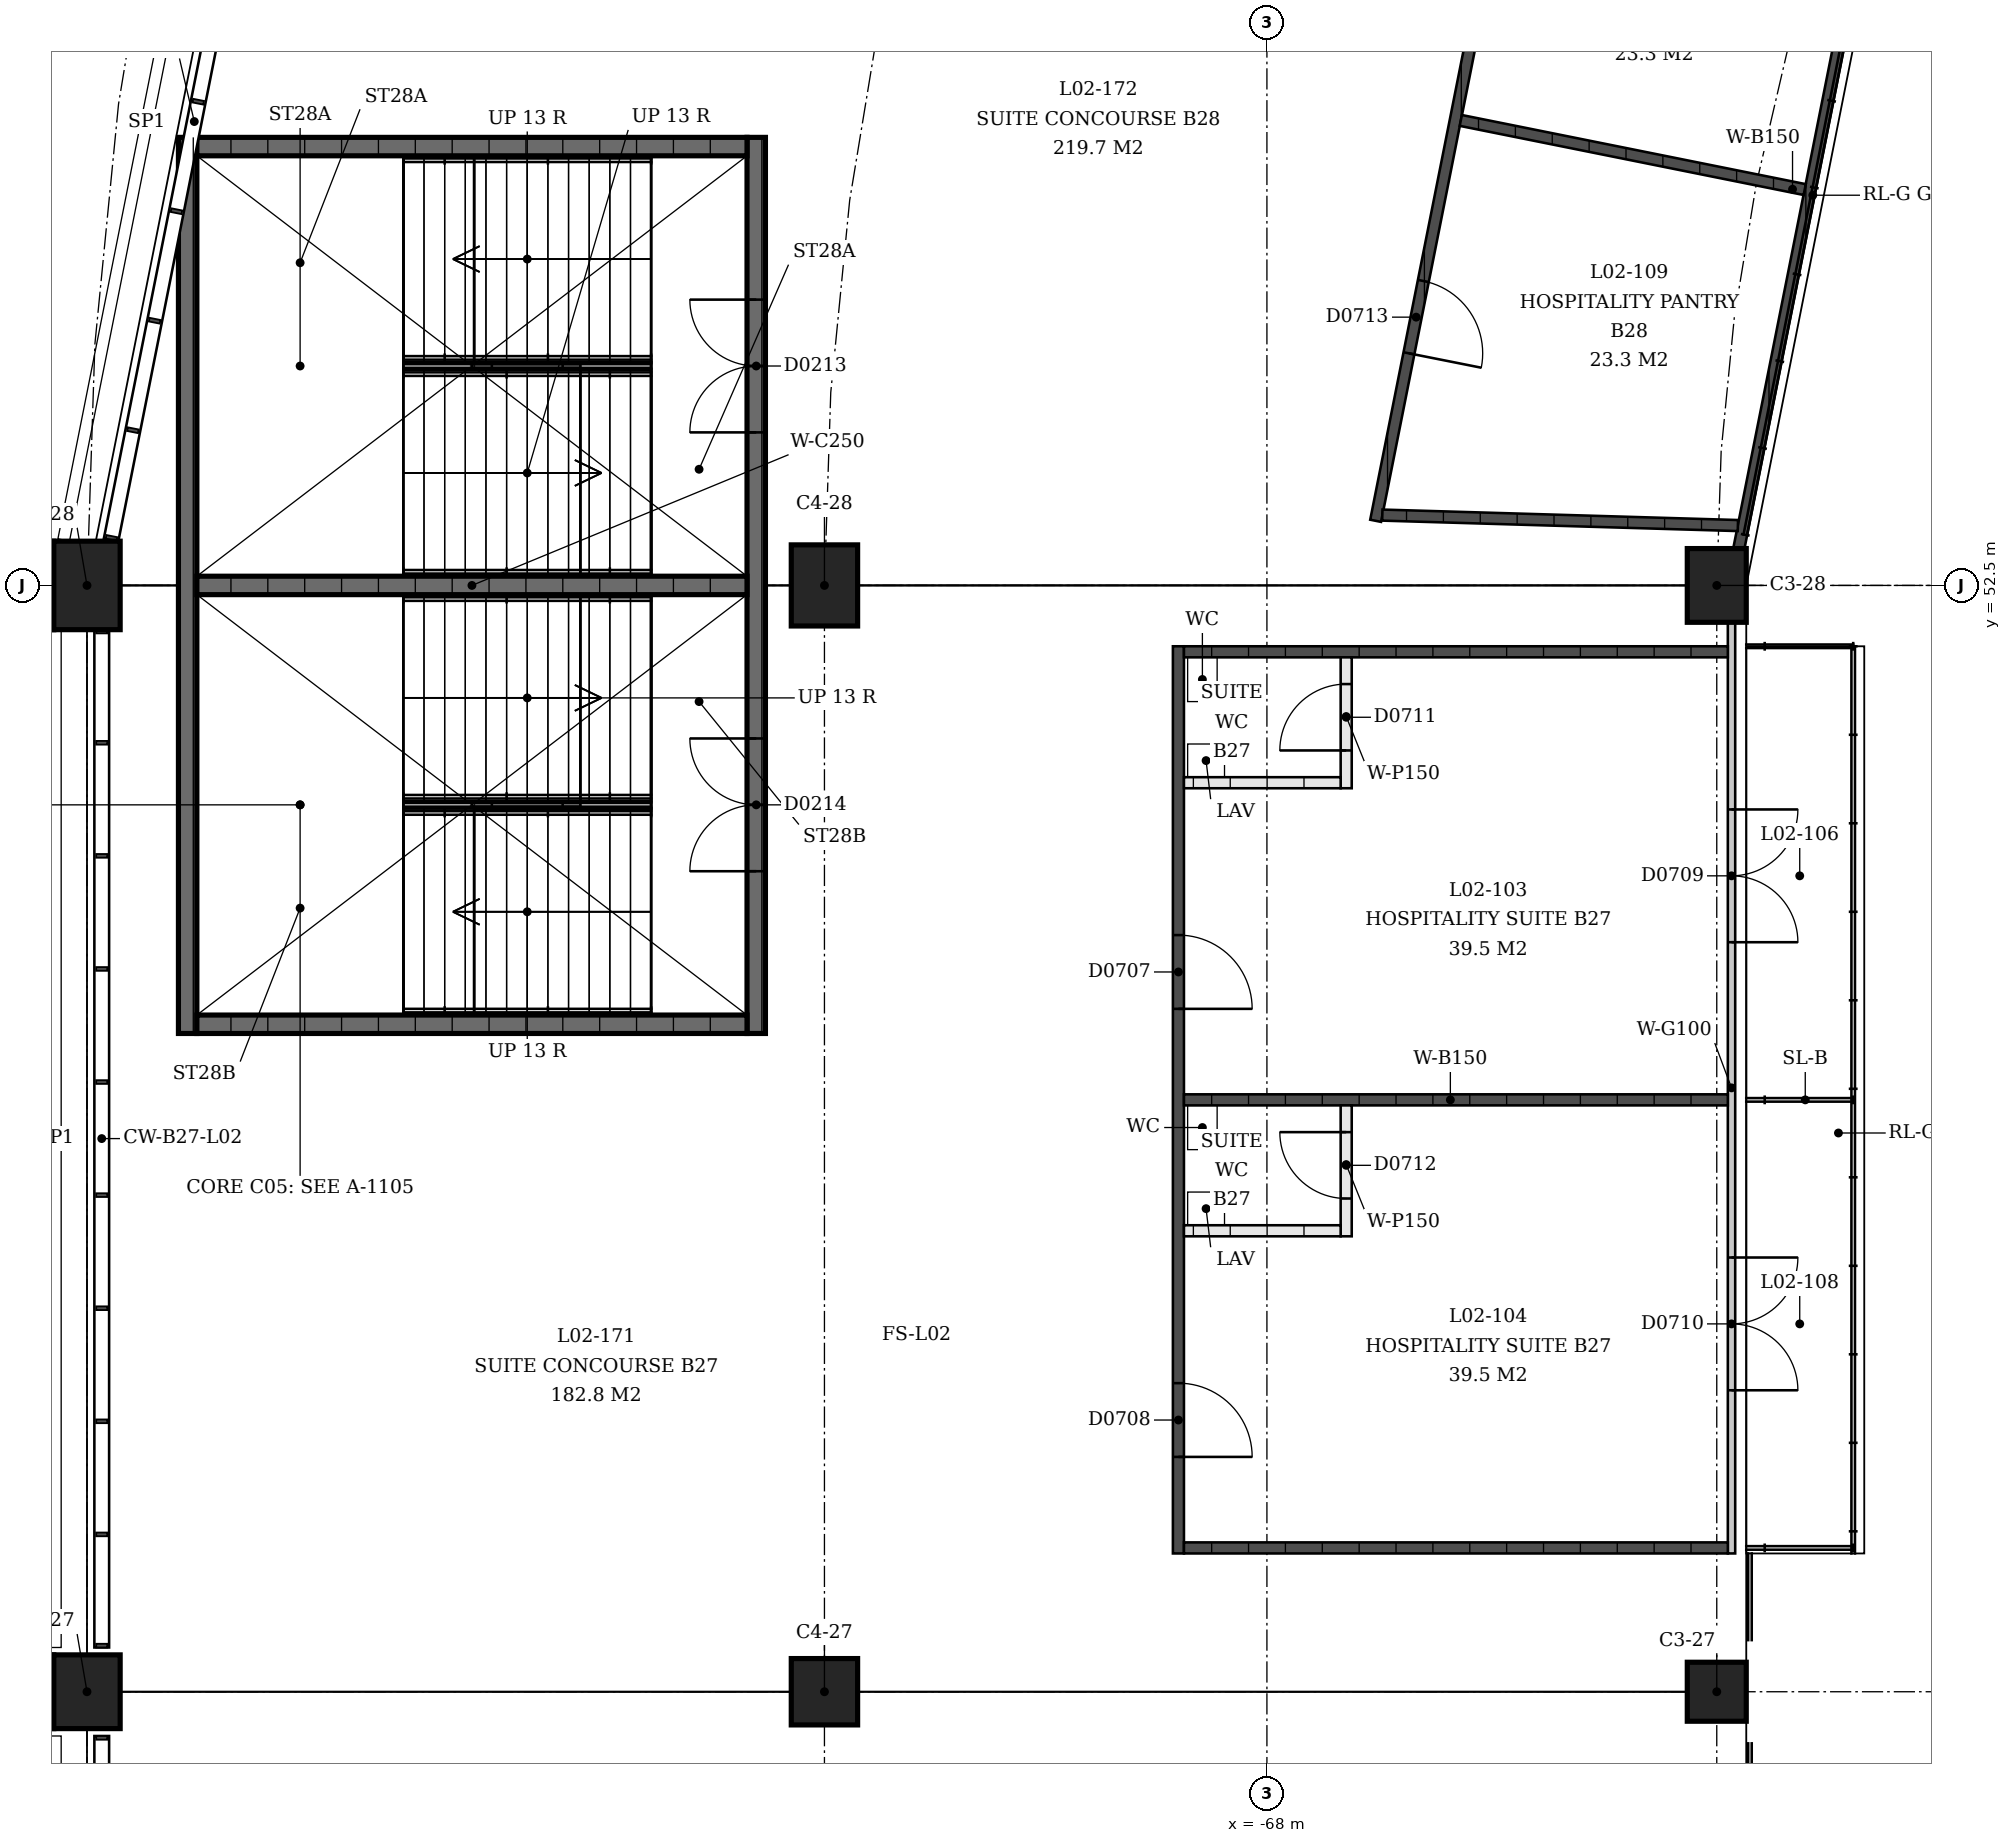
"""IFC4 building model, lengths in metres.
Left out: names, types, materials, properties, quantities, classifications, styles, units other than length and angle.
Written with IfcOpenShell. Run it as: python <this file> out.ifc"""

import sys

from ifc_helpers import new_model, si_unit, direction, frame, frame_2d, origin, origin_2d, place, context, subcontext, project, spatial, rectangle, extrude, element, fill, save


model = new_model("IFC4")
c1 = context("Model", 3, precision=1e-05, world=origin(), true_north=direction((0.0, 1.0)))
c2 = subcontext(c1, "Body", "Model", "MODEL_VIEW")
j1 = project(units=[si_unit("LENGTHUNIT", "METRE"), si_unit("PLANEANGLEUNIT", "RADIAN")], contexts=[c1])
p1 = place(None, origin())
s1 = spatial("IfcSite", under=j1, at=p1, CompositionType="ELEMENT")
p2 = place(p1, origin())
s2 = spatial("IfcBuilding", under=s1, at=p2, CompositionType="ELEMENT")
p3 = place(p2, frame((0.0, 0.0, 9.0)))
s3 = spatial("IfcBuildingStorey", under=s2, at=p3, CompositionType="ELEMENT", Elevation=9.0)
p4 = place(p3, frame((-61.9, 37.5, 0.0), z_axis=(0.0, 0.0, 1.0), x_axis=(0.0, -1.0, 0.0)))
e1 = element("IfcColumn", 1, at=p4, inside=s3, PredefinedType="COLUMN", context=c2, shape_type="SweptSolid", body=[
    extrude(rectangle(XDim=0.8, YDim=0.8, at=origin_2d()), origin(), (0.0, 0.0, 1.0), 4.5),
])
p5 = place(p3, frame((-74.0, 37.5, 0.0), z_axis=(0.0, 0.0, 1.0), x_axis=(0.0, -1.0, 0.0)))
e2 = element("IfcColumn", 2, at=p5, inside=s3, PredefinedType="COLUMN", context=c2, shape_type="SweptSolid", body=[
    extrude(rectangle(XDim=0.9, YDim=0.9, at=origin_2d()), origin(), (0.0, 0.0, 1.0), 4.5),
])
p6 = place(p3, frame((-84.0, 37.5, 0.0), z_axis=(0.0, 0.0, 1.0), x_axis=(0.0, -1.0, 0.0)))
e3 = element("IfcColumn", 3, at=p6, inside=s3, PredefinedType="COLUMN", context=c2, shape_type="SweptSolid", body=[
    extrude(rectangle(XDim=1.0, YDim=0.9, at=origin_2d()), origin(), (0.0, 0.0, 1.0), 4.5),
])
p7 = place(p3, frame((-61.9, 52.5, 0.0), z_axis=(0.0, 0.0, 1.0), x_axis=(0.0, -1.0, 0.0)))
e4 = element("IfcColumn", 4, at=p7, inside=s3, PredefinedType="COLUMN", context=c2, shape_type="SweptSolid", body=[
    extrude(rectangle(XDim=1.0, YDim=0.8, at=origin_2d()), origin(), (0.0, 0.0, 1.0), 4.5),
])
p8 = place(p3, frame((-74.0, 52.5, 0.0), z_axis=(0.0, 0.0, 1.0), x_axis=(0.0, -1.0, 0.0)))
e5 = element("IfcColumn", 5, at=p8, inside=s3, PredefinedType="COLUMN", context=c2, shape_type="SweptSolid", body=[
    extrude(rectangle(XDim=1.1, YDim=0.9, at=origin_2d()), origin(), (0.0, 0.0, 1.0), 4.5),
])
p9 = place(p3, frame((-84.0, 52.5, 0.0), z_axis=(0.0, 0.0, 1.0), x_axis=(0.0, -1.0, 0.0)))
e6 = element("IfcColumn", 6, at=p9, inside=s3, PredefinedType="COLUMN", context=c2, shape_type="SweptSolid", body=[
    extrude(rectangle(XDim=1.2, YDim=0.9, at=origin_2d()), origin(), (0.0, 0.0, 1.0), 4.5),
])
p10 = place(p3, frame((-74.925, 58.575, 0.0), z_axis=(0.0, 0.0, 1.0), x_axis=(0.0, -1.0, 0.0)))
e7 = element("IfcWall", 7, at=p10, inside=s3, PredefinedType="SHEAR", context=c2, shape_type="SweptSolid", body=[
    extrude(rectangle(XDim=12.15, YDim=0.25, at=frame_2d((6.075, 0.0))), origin(), (0.0, 0.0, 1.0), 4.09),
])
p11 = place(p10, frame((2.2, 0.0, 0.0)))
e8 = element("IfcOpeningElement", 8, at=p11, cuts=e7, PredefinedType="OPENING", context=c2, shape_type="SweptSolid", body=[
    extrude(rectangle(XDim=1.8, YDim=2.1, at=frame_2d((0.9, 1.05))), frame((0.0, 0.125, 0.0), z_axis=(0.0, -1.0, 0.0), x_axis=(1.0, 0.0, 0.0)), (0.0, 0.0, 1.0), 0.25),
])
p12 = place(p10, frame((8.15, 0.0, 0.0)))
e9 = element("IfcOpeningElement", 9, at=p12, cuts=e7, PredefinedType="OPENING", context=c2, shape_type="SweptSolid", body=[
    extrude(rectangle(XDim=1.8, YDim=2.1, at=frame_2d((0.9, 1.05))), frame((0.0, 0.125, 0.0), z_axis=(0.0, -1.0, 0.0), x_axis=(1.0, 0.0, 0.0)), (0.0, 0.0, 1.0), 0.25),
])
p13 = place(p3, frame((-82.635, 58.575, 0.0), z_axis=(0.0, 0.0, 1.0), x_axis=(0.0, -1.0, 0.0)))
e10 = element("IfcWall", 10, at=p13, inside=s3, PredefinedType="SHEAR", context=c2, shape_type="SweptSolid", body=[
    extrude(rectangle(XDim=12.15, YDim=0.25, at=frame_2d((6.075, 0.0))), origin(), (0.0, 0.0, 1.0), 4.09),
])
for number, where, z_axis, x_axis in (
    (11, (-75.05, 58.45, 0.0), (0.0, 0.0, 1.0), (-1.0, 0.0, 0.0)),
    (12, (-75.05, 46.55, 0.0), (0.0, 0.0, 1.0), (-1.0, 0.0, 0.0)),
    (13, (-75.05, 52.5, 0.0), (0.0, 0.0, 1.0), (-1.0, 0.0, 0.0)),
):
    element("IfcWall", number, at=place(p3, frame(where, z_axis=z_axis, x_axis=x_axis)), inside=s3, PredefinedType="SHEAR", context=c2, shape_type="SweptSolid", body=[
        extrude(rectangle(XDim=7.46, YDim=0.25, at=frame_2d((3.73, 0.0))), origin(), (0.0, 0.0, 1.0), 4.09),
    ])
p14 = place(p3, frame((-61.7, 52.0, 0.0), z_axis=(0.0, 0.0, 1.0), x_axis=(0.0, -1.0, 0.0)))
e14 = element("IfcWall", 14, at=p14, inside=s3, PredefinedType="PARTITIONING", context=c2, shape_type="SweptSolid", body=[
    extrude(rectangle(XDim=12.625, YDim=0.1, at=frame_2d((6.312, 0.0))), origin(), (0.0, 0.0, 1.0), 3.0),
])
p15 = place(p14, frame((2.538, 0.0, 0.0)))
e15 = element("IfcOpeningElement", 15, at=p15, cuts=e14, PredefinedType="OPENING", context=c2, shape_type="SweptSolid", body=[
    extrude(rectangle(XDim=1.8, YDim=2.1, at=frame_2d((0.9, 1.05))), frame((0.0, 0.05, 0.0), z_axis=(0.0, -1.0, 0.0), x_axis=(1.0, 0.0, 0.0)), (0.0, 0.0, 1.0), 0.1),
])
p16 = place(p14, frame((8.613, 0.0, 0.0)))
e16 = element("IfcOpeningElement", 16, at=p16, cuts=e14, PredefinedType="OPENING", context=c2, shape_type="SweptSolid", body=[
    extrude(rectangle(XDim=1.8, YDim=2.1, at=frame_2d((0.9, 1.05))), frame((0.0, 0.05, 0.0), z_axis=(0.0, -1.0, 0.0), x_axis=(1.0, 0.0, 0.0)), (0.0, 0.0, 1.0), 0.1),
])
p17 = place(p3, frame((-69.2, 51.675, 0.0), z_axis=(0.0, 0.0, 1.0), x_axis=(0.0, -1.0, 0.0)))
e17 = element("IfcWall", 17, at=p17, inside=s3, PredefinedType="SOLIDWALL", context=c2, shape_type="SweptSolid", body=[
    extrude(rectangle(XDim=12.3, YDim=0.15, at=frame_2d((6.15, 0.0))), origin(), (0.0, 0.0, 1.0), 3.0),
])
p18 = place(p17, frame((3.916, 0.0, 0.0)))
e18 = element("IfcOpeningElement", 18, at=p18, cuts=e17, PredefinedType="OPENING", context=c2, shape_type="SweptSolid", body=[
    extrude(rectangle(XDim=1.0, YDim=2.1, at=frame_2d((0.5, 1.05))), frame((0.0, 0.075, 0.0), z_axis=(0.0, -1.0, 0.0), x_axis=(1.0, 0.0, 0.0)), (0.0, 0.0, 1.0), 0.15),
])
p19 = place(p17, frame((9.991, 0.0, 0.0)))
e19 = element("IfcOpeningElement", 19, at=p19, cuts=e17, PredefinedType="OPENING", context=c2, shape_type="SweptSolid", body=[
    extrude(rectangle(XDim=1.0, YDim=2.1, at=frame_2d((0.5, 1.05))), frame((0.0, 0.075, 0.0), z_axis=(0.0, -1.0, 0.0), x_axis=(1.0, 0.0, 0.0)), (0.0, 0.0, 1.0), 0.15),
])
for number, where, z_axis, x_axis in (
    (20, (-61.75, 51.6, 0.0), (0.0, 0.0, 1.0), (-1.0, 0.0, 0.0)),
    (21, (-61.75, 45.525, 0.0), (0.0, 0.0, 1.0), (-1.0, 0.0, 0.0)),
    (22, (-61.75, 39.45, 0.0), (0.0, 0.0, 1.0), (-1.0, 0.0, 0.0)),
):
    element("IfcWall", number, at=place(p3, frame(where, z_axis=z_axis, x_axis=x_axis)), inside=s3, PredefinedType="SOLIDWALL", context=c2, shape_type="SweptSolid", body=[
        extrude(rectangle(XDim=7.375, YDim=0.15, at=frame_2d((3.688, 0.0))), origin(), (0.0, 0.0, 1.0), 3.0),
    ])
p20 = place(p3, frame((-66.925, 51.525, 0.0), z_axis=(0.0, 0.0, 1.0), x_axis=(0.0, -1.0, 0.0)))
e23 = element("IfcWall", 23, at=p20, inside=s3, PredefinedType="PARTITIONING", context=c2, shape_type="SweptSolid", body=[
    extrude(rectangle(XDim=1.775, YDim=0.15, at=frame_2d((0.887, 0.0))), origin(), (0.0, 0.0, 1.0), 3.0),
])
p21 = place(p20, frame((0.363, 0.0, 0.0)))
e24 = element("IfcOpeningElement", 24, at=p21, cuts=e23, PredefinedType="OPENING", context=c2, shape_type="SweptSolid", body=[
    extrude(rectangle(XDim=0.9, YDim=2.1, at=frame_2d((0.45, 1.05))), frame((0.0, 0.075, 0.0), z_axis=(0.0, -1.0, 0.0), x_axis=(1.0, 0.0, 0.0)), (0.0, 0.0, 1.0), 0.15),
])
p22 = place(p3, frame((-67.0, 49.825, 0.0), z_axis=(0.0, 0.0, 1.0), x_axis=(-1.0, 0.0, 0.0)))
e25 = element("IfcWall", 25, at=p22, inside=s3, PredefinedType="PARTITIONING", context=c2, shape_type="SweptSolid", body=[
    extrude(rectangle(XDim=2.125, YDim=0.15, at=frame_2d((1.062, 0.0))), origin(), (0.0, 0.0, 1.0), 3.0),
])
p23 = place(p3, frame((-66.925, 45.45, 0.0), z_axis=(0.0, 0.0, 1.0), x_axis=(0.0, -1.0, 0.0)))
e26 = element("IfcWall", 26, at=p23, inside=s3, PredefinedType="PARTITIONING", context=c2, shape_type="SweptSolid", body=[
    extrude(rectangle(XDim=1.775, YDim=0.15, at=frame_2d((0.887, 0.0))), origin(), (0.0, 0.0, 1.0), 3.0),
])
p24 = place(p23, frame((0.363, 0.0, 0.0)))
e27 = element("IfcOpeningElement", 27, at=p24, cuts=e26, PredefinedType="OPENING", context=c2, shape_type="SweptSolid", body=[
    extrude(rectangle(XDim=0.9, YDim=2.1, at=frame_2d((0.45, 1.05))), frame((0.0, 0.075, 0.0), z_axis=(0.0, -1.0, 0.0), x_axis=(1.0, 0.0, 0.0)), (0.0, 0.0, 1.0), 0.15),
])
p25 = place(p3, frame((-67.0, 43.75, 0.0), z_axis=(0.0, 0.0, 1.0), x_axis=(-1.0, 0.0, 0.0)))
e28 = element("IfcWall", 28, at=p25, inside=s3, PredefinedType="PARTITIONING", context=c2, shape_type="SweptSolid", body=[
    extrude(rectangle(XDim=2.125, YDim=0.15, at=frame_2d((1.062, 0.0))), origin(), (0.0, 0.0, 1.0), 3.0),
])
p26 = place(p3, frame((-61.601, 53.0, 0.0), z_axis=(0.0, 0.0, 1.0), x_axis=(0.195099676887, 0.980783419557, 0.0)))
e29 = element("IfcWall", 29, at=p26, inside=s3, PredefinedType="SOLIDWALL", context=c2, shape_type="SweptSolid", body=[
    extrude(rectangle(XDim=9.839, YDim=0.15, at=frame_2d((4.92, 0.0))), origin(), (0.0, 0.0, 1.0), 3.0),
])
p27 = place(p3, frame((-66.526, 53.376, 0.0), z_axis=(0.0, 0.0, 1.0), x_axis=(0.195088107962, 0.980785720803, 0.0)))
e30 = element("IfcWall", 30, at=p27, inside=s3, PredefinedType="SOLIDWALL", context=c2, shape_type="SweptSolid", body=[
    extrude(rectangle(XDim=11.099, YDim=0.15, at=frame_2d((5.55, 0.0))), origin(), (0.0, 0.0, 1.0), 3.0),
])
p28 = place(p27, frame((2.315, 0.0, 0.0)))
e31 = element("IfcOpeningElement", 31, at=p28, cuts=e30, PredefinedType="OPENING", context=c2, shape_type="SweptSolid", body=[
    extrude(rectangle(XDim=1.0, YDim=2.1, at=frame_2d((0.5, 1.05))), frame((0.0, 0.075, 0.0), z_axis=(0.0, -1.0, 0.0), x_axis=(1.0, 0.0, 0.0)), (0.0, 0.0, 1.0), 0.15),
])
p29 = place(p27, frame((7.784, 0.0, 0.0)))
e32 = element("IfcOpeningElement", 32, at=p29, cuts=e30, PredefinedType="OPENING", context=c2, shape_type="SweptSolid", body=[
    extrude(rectangle(XDim=1.0, YDim=2.1, at=frame_2d((0.5, 1.05))), frame((0.0, 0.075, 0.0), z_axis=(0.0, -1.0, 0.0), x_axis=(1.0, 0.0, 0.0)), (0.0, 0.0, 1.0), 0.15),
])
p30 = place(p3, frame((-61.614, 53.312, 0.0), z_axis=(0.0, 0.0, 1.0), x_axis=(-0.999567579473, 0.029405000692, 0.0)))
e33 = element("IfcWall", 33, at=p30, inside=s3, PredefinedType="SOLIDWALL", context=c2, shape_type="SweptSolid", body=[
    extrude(rectangle(XDim=4.824, YDim=0.15, at=frame_2d((2.412, 0.0))), origin(), (0.0, 0.0, 1.0), 3.0),
])
p31 = place(p3, frame((-60.707, 57.867, 0.0), z_axis=(0.0, 0.0, 1.0), x_axis=(-0.980396663012, 0.19703396447, 0.0)))
e34 = element("IfcWall", 34, at=p31, inside=s3, PredefinedType="SOLIDWALL", context=c2, shape_type="SweptSolid", body=[
    extrude(rectangle(XDim=4.757, YDim=0.15, at=frame_2d((2.378, 0.0))), origin(), (0.0, 0.0, 1.0), 3.0),
])
p32 = place(p11, origin())
e35 = element("IfcDoor", 35, at=p32, inside=s3, OperationType="DOUBLE_DOOR_SINGLE_SWING", PredefinedType="DOOR", context=c2, shape_type="SweptSolid", body=[
    extrude(rectangle(XDim=1.8, YDim=2.1, at=frame_2d((0.9, 1.05))), frame((0.0, 0.025, 0.0), z_axis=(0.0, -1.0, 0.0), x_axis=(1.0, 0.0, 0.0)), (0.0, 0.0, 1.0), 0.05),
])
fill(e8, e35)
p33 = place(p12, origin())
e36 = element("IfcDoor", 36, at=p33, inside=s3, OperationType="DOUBLE_DOOR_SINGLE_SWING", PredefinedType="DOOR", context=c2, shape_type="SweptSolid", body=[
    extrude(rectangle(XDim=1.8, YDim=2.1, at=frame_2d((0.9, 1.05))), frame((0.0, 0.025, 0.0), z_axis=(0.0, -1.0, 0.0), x_axis=(1.0, 0.0, 0.0)), (0.0, 0.0, 1.0), 0.05),
])
fill(e9, e36)
p34 = place(p18, origin())
e37 = element("IfcDoor", 37, at=p34, inside=s3, OperationType="SINGLE_SWING_LEFT", PredefinedType="DOOR", context=c2, shape_type="SweptSolid", body=[
    extrude(rectangle(XDim=1.0, YDim=2.1, at=frame_2d((0.5, 1.05))), frame((0.0, 0.025, 0.0), z_axis=(0.0, -1.0, 0.0), x_axis=(1.0, 0.0, 0.0)), (0.0, 0.0, 1.0), 0.05),
])
fill(e18, e37)
p35 = place(p19, origin())
e38 = element("IfcDoor", 38, at=p35, inside=s3, OperationType="SINGLE_SWING_LEFT", PredefinedType="DOOR", context=c2, shape_type="SweptSolid", body=[
    extrude(rectangle(XDim=1.0, YDim=2.1, at=frame_2d((0.5, 1.05))), frame((0.0, 0.025, 0.0), z_axis=(0.0, -1.0, 0.0), x_axis=(1.0, 0.0, 0.0)), (0.0, 0.0, 1.0), 0.05),
])
fill(e19, e38)
p36 = place(p15, origin())
e39 = element("IfcDoor", 39, at=p36, inside=s3, OperationType="DOUBLE_DOOR_SINGLE_SWING", PredefinedType="DOOR", context=c2, shape_type="SweptSolid", body=[
    extrude(rectangle(XDim=1.8, YDim=2.1, at=frame_2d((0.9, 1.05))), frame((0.0, 0.025, 0.0), z_axis=(0.0, -1.0, 0.0), x_axis=(1.0, 0.0, 0.0)), (0.0, 0.0, 1.0), 0.05),
])
fill(e15, e39)
p37 = place(p16, origin())
e40 = element("IfcDoor", 40, at=p37, inside=s3, OperationType="DOUBLE_DOOR_SINGLE_SWING", PredefinedType="DOOR", context=c2, shape_type="SweptSolid", body=[
    extrude(rectangle(XDim=1.8, YDim=2.1, at=frame_2d((0.9, 1.05))), frame((0.0, 0.025, 0.0), z_axis=(0.0, -1.0, 0.0), x_axis=(1.0, 0.0, 0.0)), (0.0, 0.0, 1.0), 0.05),
])
fill(e16, e40)
p38 = place(p21, origin())
e41 = element("IfcDoor", 41, at=p38, inside=s3, OperationType="SINGLE_SWING_RIGHT", PredefinedType="DOOR", context=c2, shape_type="SweptSolid", body=[
    extrude(rectangle(XDim=0.9, YDim=2.1, at=frame_2d((0.45, 1.05))), frame((0.0, 0.025, 0.0), z_axis=(0.0, -1.0, 0.0), x_axis=(1.0, 0.0, 0.0)), (0.0, 0.0, 1.0), 0.05),
])
fill(e24, e41)
p39 = place(p24, origin())
e42 = element("IfcDoor", 42, at=p39, inside=s3, OperationType="SINGLE_SWING_LEFT", PredefinedType="DOOR", context=c2, shape_type="SweptSolid", body=[
    extrude(rectangle(XDim=0.9, YDim=2.1, at=frame_2d((0.45, 1.05))), frame((0.0, 0.025, 0.0), z_axis=(0.0, -1.0, 0.0), x_axis=(1.0, 0.0, 0.0)), (0.0, 0.0, 1.0), 0.05),
])
fill(e27, e42)
p40 = place(p28, origin())
e43 = element("IfcDoor", 43, at=p40, inside=s3, OperationType="SINGLE_SWING_LEFT", PredefinedType="DOOR", context=c2, shape_type="SweptSolid", body=[
    extrude(rectangle(XDim=1.0, YDim=2.1, at=frame_2d((0.5, 1.05))), frame((0.0, 0.025, 0.0), z_axis=(0.0, -1.0, 0.0), x_axis=(1.0, 0.0, 0.0)), (0.0, 0.0, 1.0), 0.05),
])
fill(e31, e43)
save(model, sys.argv[1])
